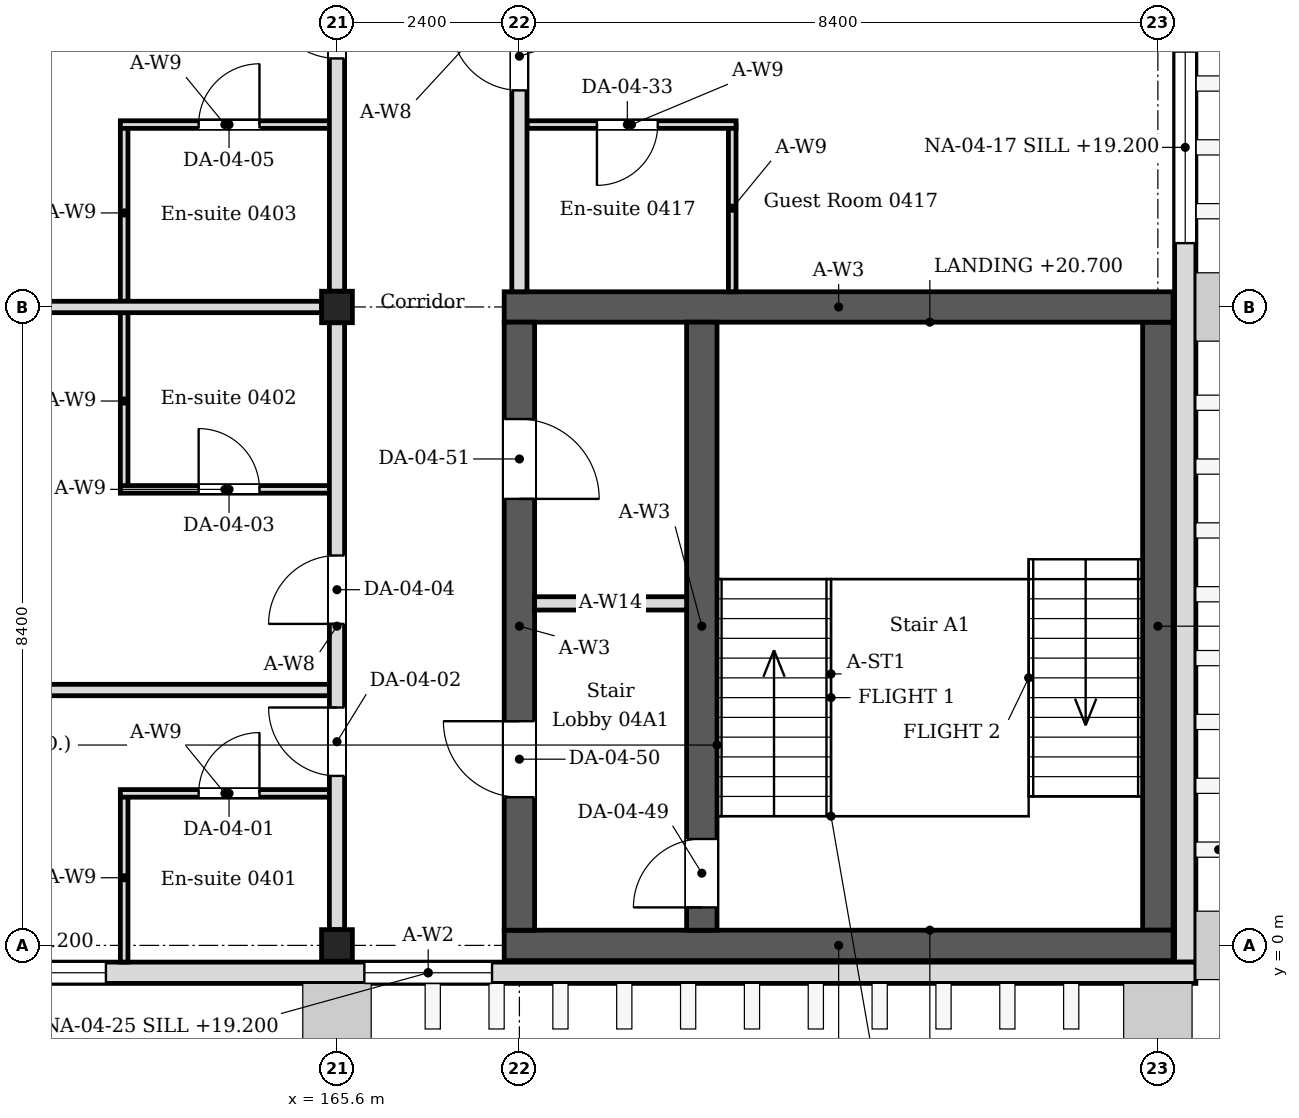
"""IFC4 building model, lengths in metres.
Left out: names, types, materials, properties, quantities, classifications, styles, units other than length and angle.
Written with IfcOpenShell. Run it as: python <this file> out.ifc"""

import sys

from ifc_helpers import new_model, si_unit, direction, frame, frame_2d, origin, origin_2d, place, context, subcontext, project, spatial, rectangle, i_section, extrude, element, fill, save


model = new_model("IFC4")
c1 = context("Model", 3, precision=1e-05, world=origin(), true_north=direction((0.0, 1.0)))
c2 = subcontext(c1, "Body", "Model", "MODEL_VIEW")
j1 = project(units=[si_unit("LENGTHUNIT", "METRE"), si_unit("PLANEANGLEUNIT", "RADIAN")], contexts=[c1])
p1 = place(None, origin())
s1 = spatial("IfcSite", under=j1, at=p1, CompositionType="ELEMENT")
p2 = place(p1, origin())
s2 = spatial("IfcBuilding", under=s1, at=p2, CompositionType="ELEMENT")
p3 = place(p2, frame((0.0, 0.0, 18.6)))
s3 = spatial("IfcBuildingStorey", under=s2, at=p3, CompositionType="ELEMENT", Elevation=18.6)
for number, where, z_axis, x_axis in (
    (1, (165.6, 0.0, 0.0), (0.0, 0.0, 1.0), (1.0, 0.0, 0.0)),
    (2, (165.6, 8.4, 0.0), (0.0, 0.0, 1.0), (1.0, 0.0, 0.0)),
):
    element("IfcColumn", number, at=place(p3, frame(where, z_axis=z_axis, x_axis=x_axis)), inside=s3, PredefinedType="COLUMN", context=c2, shape_type="SweptSolid", body=[
        extrude(i_section(OverallWidth=0.405, OverallDepth=0.414, WebThickness=0.018, FlangeThickness=0.028, FilletRadius=0.022, at=origin_2d()), origin(), (0.0, 0.0, 1.0), 4.2),
    ])
for number, where, z_axis, x_axis in (
    (3, (167.8, 0.0, 0.0), (0.0, 0.0, 1.0), (1.0, 0.0, 0.0)),
    (4, (167.8, 8.4, 0.0), (0.0, 0.0, 1.0), (1.0, 0.0, 0.0)),
):
    element("IfcWall", number, at=place(p3, frame(where, z_axis=z_axis, x_axis=x_axis)), inside=s3, PredefinedType="SOLIDWALL", context=c2, shape_type="SweptSolid", body=[
        extrude(rectangle(XDim=8.8, YDim=0.4, at=frame_2d((4.4, 0.0))), origin(), (0.0, 0.0, 1.0), 4.05),
    ])
p4 = place(p3, frame((168.0, 0.2, 0.0), z_axis=(0.0, 0.0, 1.0), x_axis=(0.0, 1.0, 0.0)))
e5 = element("IfcWall", 5, at=p4, inside=s3, PredefinedType="SOLIDWALL", context=c2, shape_type="SweptSolid", body=[
    extrude(rectangle(XDim=8.0, YDim=0.4, at=frame_2d((4.0, 0.0))), origin(), (0.0, 0.0, 1.0), 4.05),
])
p5 = place(p4, frame((1.75, 0.0, 0.0)))
e6 = element("IfcOpeningElement", 6, at=p5, cuts=e5, PredefinedType="OPENING", context=c2, shape_type="SweptSolid", body=[
    extrude(rectangle(XDim=1.0, YDim=2.1, at=frame_2d((0.5, 1.05))), frame((0.0, 0.21, 0.0), z_axis=(0.0, -1.0, 0.0), x_axis=(1.0, 0.0, 0.0)), (0.0, 0.0, 1.0), 0.42),
])
p6 = place(p4, frame((5.675, 0.0, 0.0)))
e7 = element("IfcOpeningElement", 7, at=p6, cuts=e5, PredefinedType="OPENING", context=c2, shape_type="SweptSolid", body=[
    extrude(rectangle(XDim=1.05, YDim=2.1, at=frame_2d((0.525, 1.05))), frame((0.0, 0.21, 0.0), z_axis=(0.0, -1.0, 0.0), x_axis=(1.0, 0.0, 0.0)), (0.0, 0.0, 1.0), 0.42),
])
p7 = place(p3, frame((176.4, 0.2, 0.0), z_axis=(0.0, 0.0, 1.0), x_axis=(0.0, 1.0, 0.0)))
e8 = element("IfcWall", 8, at=p7, inside=s3, PredefinedType="SOLIDWALL", context=c2, shape_type="SweptSolid", body=[
    extrude(rectangle(XDim=8.0, YDim=0.4, at=frame_2d((4.0, 0.0))), origin(), (0.0, 0.0, 1.0), 4.05),
])
p8 = place(p3, frame((176.76, -0.22, 0.0), z_axis=(0.0, 0.0, 1.0), x_axis=(0.0, 1.0, 0.0)))
e9 = element("IfcWall", 9, at=p8, inside=s3, PredefinedType="SOLIDWALL", context=c2, shape_type="SweptSolid", body=[
    extrude(rectangle(XDim=42.57, YDim=0.28, at=frame_2d((21.285, 0.0))), origin(), (0.0, 0.0, 1.0), 4.05),
])
p9 = place(p8, frame((9.46, 0.0, 0.6)))
e10 = element("IfcOpeningElement", 10, at=p9, cuts=e9, PredefinedType="OPENING", context=c2, shape_type="SweptSolid", body=[
    extrude(rectangle(XDim=2.52, YDim=2.4, at=frame_2d((1.26, 1.2))), frame((0.0, 0.15, 0.0), z_axis=(0.0, -1.0, 0.0), x_axis=(1.0, 0.0, 0.0)), (0.0, 0.0, 1.0), 0.3),
])
p10 = place(p8, frame((13.66, 0.0, 0.6)))
e11 = element("IfcOpeningElement", 11, at=p10, cuts=e9, PredefinedType="OPENING", context=c2, shape_type="SweptSolid", body=[
    extrude(rectangle(XDim=2.52, YDim=2.4, at=frame_2d((1.26, 1.2))), frame((0.0, 0.15, 0.0), z_axis=(0.0, -1.0, 0.0), x_axis=(1.0, 0.0, 0.0)), (0.0, 0.0, 1.0), 0.3),
])
p11 = place(p8, frame((17.86, 0.0, 0.6)))
e12 = element("IfcOpeningElement", 12, at=p11, cuts=e9, PredefinedType="OPENING", context=c2, shape_type="SweptSolid", body=[
    extrude(rectangle(XDim=2.52, YDim=2.4, at=frame_2d((1.26, 1.2))), frame((0.0, 0.15, 0.0), z_axis=(0.0, -1.0, 0.0), x_axis=(1.0, 0.0, 0.0)), (0.0, 0.0, 1.0), 0.3),
])
p12 = place(p8, frame((22.06, 0.0, 0.6)))
e13 = element("IfcOpeningElement", 13, at=p12, cuts=e9, PredefinedType="OPENING", context=c2, shape_type="SweptSolid", body=[
    extrude(rectangle(XDim=2.52, YDim=2.4, at=frame_2d((1.26, 1.2))), frame((0.0, 0.15, 0.0), z_axis=(0.0, -1.0, 0.0), x_axis=(1.0, 0.0, 0.0)), (0.0, 0.0, 1.0), 0.3),
])
p13 = place(p3, frame((156.7, -0.36, 0.0), z_axis=(0.0, 0.0, 1.0), x_axis=(1.0, 0.0, 0.0)))
e14 = element("IfcWall", 14, at=p13, inside=s3, PredefinedType="SOLIDWALL", context=c2, shape_type="SweptSolid", body=[
    extrude(rectangle(XDim=20.2, YDim=0.28, at=frame_2d((10.1, 0.0))), origin(), (0.0, 0.0, 1.0), 4.05),
])
p14 = place(p13, frame((9.26, 0.0, 0.6)))
e15 = element("IfcOpeningElement", 15, at=p14, cuts=e14, PredefinedType="OPENING", context=c2, shape_type="SweptSolid", body=[
    extrude(rectangle(XDim=1.68, YDim=2.4, at=frame_2d((0.84, 1.2))), frame((0.0, 0.15, 0.0), z_axis=(0.0, -1.0, 0.0), x_axis=(1.0, 0.0, 0.0)), (0.0, 0.0, 1.0), 0.3),
])
p15 = place(p13, frame((3.34, 0.0, 0.6)))
e16 = element("IfcOpeningElement", 16, at=p15, cuts=e14, PredefinedType="OPENING", context=c2, shape_type="SweptSolid", body=[
    extrude(rectangle(XDim=2.52, YDim=2.4, at=frame_2d((1.26, 1.2))), frame((0.0, 0.15, 0.0), z_axis=(0.0, -1.0, 0.0), x_axis=(1.0, 0.0, 0.0)), (0.0, 0.0, 1.0), 0.3),
])
p16 = place(p3, frame((162.8, -0.22, 0.0), z_axis=(0.0, 0.0, 1.0), x_axis=(0.0, 1.0, 0.0)))
e17 = element("IfcWall", 17, at=p16, inside=s3, PredefinedType="PARTITIONING", context=c2, shape_type="SweptSolid", body=[
    extrude(rectangle(XDim=2.22, YDim=0.1, at=frame_2d((1.11, 0.0))), origin(), (0.0, 0.0, 1.0), 4.05),
])
p17 = place(p3, frame((162.75, 2.0, 0.0), z_axis=(0.0, 0.0, 1.0), x_axis=(1.0, 0.0, 0.0)))
e18 = element("IfcWall", 18, at=p17, inside=s3, PredefinedType="PARTITIONING", context=c2, shape_type="SweptSolid", body=[
    extrude(rectangle(XDim=2.75, YDim=0.1, at=frame_2d((1.375, 0.0))), origin(), (0.0, 0.0, 1.0), 4.05),
])
p18 = place(p17, frame((1.03, 0.0, 0.0)))
e19 = element("IfcOpeningElement", 19, at=p18, cuts=e18, PredefinedType="OPENING", context=c2, shape_type="SweptSolid", body=[
    extrude(rectangle(XDim=0.8, YDim=2.1, at=frame_2d((0.4, 1.05))), frame((0.0, 0.06, 0.0), z_axis=(0.0, -1.0, 0.0), x_axis=(1.0, 0.0, 0.0)), (0.0, 0.0, 1.0), 0.12),
])
p19 = place(p3, frame((162.8, 6.0, 0.0), z_axis=(0.0, 0.0, 1.0), x_axis=(0.0, 1.0, 0.0)))
e20 = element("IfcWall", 20, at=p19, inside=s3, PredefinedType="PARTITIONING", context=c2, shape_type="SweptSolid", body=[
    extrude(rectangle(XDim=2.325, YDim=0.1, at=frame_2d((1.163, 0.0))), origin(), (0.0, 0.0, 1.0), 4.05),
])
p20 = place(p3, frame((162.75, 6.0, 0.0), z_axis=(0.0, 0.0, 1.0), x_axis=(1.0, 0.0, 0.0)))
e21 = element("IfcWall", 21, at=p20, inside=s3, PredefinedType="PARTITIONING", context=c2, shape_type="SweptSolid", body=[
    extrude(rectangle(XDim=2.75, YDim=0.1, at=frame_2d((1.375, 0.0))), origin(), (0.0, 0.0, 1.0), 4.05),
])
p21 = place(p20, frame((1.03, 0.0, 0.0)))
e22 = element("IfcOpeningElement", 22, at=p21, cuts=e21, PredefinedType="OPENING", context=c2, shape_type="SweptSolid", body=[
    extrude(rectangle(XDim=0.8, YDim=2.1, at=frame_2d((0.4, 1.05))), frame((0.0, 0.06, 0.0), z_axis=(0.0, -1.0, 0.0), x_axis=(1.0, 0.0, 0.0)), (0.0, 0.0, 1.0), 0.12),
])
p22 = place(p3, frame((162.8, 8.475, 0.0), z_axis=(0.0, 0.0, 1.0), x_axis=(0.0, 1.0, 0.0)))
e23 = element("IfcWall", 23, at=p22, inside=s3, PredefinedType="PARTITIONING", context=c2, shape_type="SweptSolid", body=[
    extrude(rectangle(XDim=2.325, YDim=0.1, at=frame_2d((1.163, 0.0))), origin(), (0.0, 0.0, 1.0), 4.05),
])
p23 = place(p3, frame((162.75, 10.8, 0.0), z_axis=(0.0, 0.0, 1.0), x_axis=(1.0, 0.0, 0.0)))
e24 = element("IfcWall", 24, at=p23, inside=s3, PredefinedType="PARTITIONING", context=c2, shape_type="SweptSolid", body=[
    extrude(rectangle(XDim=2.75, YDim=0.1, at=frame_2d((1.375, 0.0))), origin(), (0.0, 0.0, 1.0), 4.05),
])
p24 = place(p23, frame((1.03, 0.0, 0.0)))
e25 = element("IfcOpeningElement", 25, at=p24, cuts=e24, PredefinedType="OPENING", context=c2, shape_type="SweptSolid", body=[
    extrude(rectangle(XDim=0.8, YDim=2.1, at=frame_2d((0.4, 1.05))), frame((0.0, 0.06, 0.0), z_axis=(0.0, -1.0, 0.0), x_axis=(1.0, 0.0, 0.0)), (0.0, 0.0, 1.0), 0.12),
])
p25 = place(p3, frame((170.8, 8.6, 0.0), z_axis=(0.0, 0.0, 1.0), x_axis=(0.0, 1.0, 0.0)))
e26 = element("IfcWall", 26, at=p25, inside=s3, PredefinedType="PARTITIONING", context=c2, shape_type="SweptSolid", body=[
    extrude(rectangle(XDim=2.2, YDim=0.1, at=frame_2d((1.1, 0.0))), origin(), (0.0, 0.0, 1.0), 4.05),
])
p26 = place(p3, frame((170.85, 10.8, 0.0), z_axis=(0.0, 0.0, 1.0), x_axis=(-1.0, 0.0, 0.0)))
e27 = element("IfcWall", 27, at=p26, inside=s3, PredefinedType="PARTITIONING", context=c2, shape_type="SweptSolid", body=[
    extrude(rectangle(XDim=2.75, YDim=0.1, at=frame_2d((1.375, 0.0))), origin(), (0.0, 0.0, 1.0), 4.05),
])
p27 = place(p26, frame((1.03, 0.0, 0.0)))
e28 = element("IfcOpeningElement", 28, at=p27, cuts=e27, PredefinedType="OPENING", context=c2, shape_type="SweptSolid", body=[
    extrude(rectangle(XDim=0.8, YDim=2.1, at=frame_2d((0.4, 1.05))), frame((0.0, 0.06, 0.0), z_axis=(0.0, -1.0, 0.0), x_axis=(1.0, 0.0, 0.0)), (0.0, 0.0, 1.0), 0.12),
])
p28 = place(p3, frame((157.403, 8.4, 0.0), z_axis=(0.0, 0.0, 1.0), x_axis=(1.0, 0.0, 0.0)))
e29 = element("IfcWall", 29, at=p28, inside=s3, PredefinedType="PARTITIONING", context=c2, shape_type="SweptSolid", body=[
    extrude(rectangle(XDim=7.995, YDim=0.15, at=frame_2d((3.998, 0.0))), origin(), (0.0, 0.0, 1.0), 3.604),
])
p29 = place(p3, frame((156.98, 3.36, 0.0), z_axis=(0.0, 0.0, 1.0), x_axis=(1.0, 0.0, 0.0)))
e30 = element("IfcWall", 30, at=p29, inside=s3, PredefinedType="PARTITIONING", context=c2, shape_type="SweptSolid", body=[
    extrude(rectangle(XDim=8.52, YDim=0.15, at=frame_2d((4.26, 0.0))), origin(), (0.0, 0.0, 1.0), 3.604),
])
p30 = place(p3, frame((165.6, 0.207, 0.0), z_axis=(0.0, 0.0, 1.0), x_axis=(0.0, 1.0, 0.0)))
e31 = element("IfcWall", 31, at=p30, inside=s3, PredefinedType="PARTITIONING", context=c2, shape_type="SweptSolid", body=[
    extrude(rectangle(XDim=7.986, YDim=0.2, at=frame_2d((3.993, 0.0))), origin(), (0.0, 0.0, 1.0), 3.45),
])
p31 = place(p30, frame((2.023, 0.0, 0.0)))
e32 = element("IfcOpeningElement", 32, at=p31, cuts=e31, PredefinedType="OPENING", context=c2, shape_type="SweptSolid", body=[
    extrude(rectangle(XDim=0.9, YDim=2.1, at=frame_2d((0.45, 1.05))), frame((0.0, 0.11, 0.0), z_axis=(0.0, -1.0, 0.0), x_axis=(1.0, 0.0, 0.0)), (0.0, 0.0, 1.0), 0.22),
])
p32 = place(p30, frame((4.023, 0.0, 0.0)))
e33 = element("IfcOpeningElement", 33, at=p32, cuts=e31, PredefinedType="OPENING", context=c2, shape_type="SweptSolid", body=[
    extrude(rectangle(XDim=0.9, YDim=2.1, at=frame_2d((0.45, 1.05))), frame((0.0, 0.11, 0.0), z_axis=(0.0, -1.0, 0.0), x_axis=(1.0, 0.0, 0.0)), (0.0, 0.0, 1.0), 0.22),
])
p33 = place(p3, frame((165.6, 8.607, 0.0), z_axis=(0.0, 0.0, 1.0), x_axis=(0.0, 1.0, 0.0)))
e34 = element("IfcWall", 34, at=p33, inside=s3, PredefinedType="PARTITIONING", context=c2, shape_type="SweptSolid", body=[
    extrude(rectangle(XDim=7.986, YDim=0.2, at=frame_2d((3.993, 0.0))), origin(), (0.0, 0.0, 1.0), 3.45),
])
p34 = place(p33, frame((3.063, 0.0, 0.0)))
e35 = element("IfcOpeningElement", 35, at=p34, cuts=e34, PredefinedType="OPENING", context=c2, shape_type="SweptSolid", body=[
    extrude(rectangle(XDim=0.9, YDim=2.1, at=frame_2d((0.45, 1.05))), frame((0.0, 0.11, 0.0), z_axis=(0.0, -1.0, 0.0), x_axis=(1.0, 0.0, 0.0)), (0.0, 0.0, 1.0), 0.22),
])
p35 = place(p33, frame((5.063, 0.0, 0.0)))
e36 = element("IfcOpeningElement", 36, at=p35, cuts=e34, PredefinedType="OPENING", context=c2, shape_type="SweptSolid", body=[
    extrude(rectangle(XDim=0.9, YDim=2.1, at=frame_2d((0.45, 1.05))), frame((0.0, 0.11, 0.0), z_axis=(0.0, -1.0, 0.0), x_axis=(1.0, 0.0, 0.0)), (0.0, 0.0, 1.0), 0.22),
])
p36 = place(p3, frame((168.0, 8.6, 0.0), z_axis=(0.0, 0.0, 1.0), x_axis=(0.0, 1.0, 0.0)))
e37 = element("IfcWall", 37, at=p36, inside=s3, PredefinedType="PARTITIONING", context=c2, shape_type="SweptSolid", body=[
    extrude(rectangle(XDim=7.993, YDim=0.2, at=frame_2d((3.997, 0.0))), origin(), (0.0, 0.0, 1.0), 3.45),
])
p37 = place(p36, frame((2.65, 0.0, 0.0)))
e38 = element("IfcOpeningElement", 38, at=p37, cuts=e37, PredefinedType="OPENING", context=c2, shape_type="SweptSolid", body=[
    extrude(rectangle(XDim=0.9, YDim=2.1, at=frame_2d((0.45, 1.05))), frame((0.0, 0.11, 0.0), z_axis=(0.0, -1.0, 0.0), x_axis=(1.0, 0.0, 0.0)), (0.0, 0.0, 1.0), 0.22),
])
p38 = place(p36, frame((4.45, 0.0, 0.0)))
e39 = element("IfcOpeningElement", 39, at=p38, cuts=e37, PredefinedType="OPENING", context=c2, shape_type="SweptSolid", body=[
    extrude(rectangle(XDim=0.9, YDim=2.1, at=frame_2d((0.45, 1.05))), frame((0.0, 0.11, 0.0), z_axis=(0.0, -1.0, 0.0), x_axis=(1.0, 0.0, 0.0)), (0.0, 0.0, 1.0), 0.22),
])
p39 = place(p3, frame((170.4, 0.2, 0.0), z_axis=(0.0, 0.0, 1.0), x_axis=(0.0, 1.0, 0.0)))
e40 = element("IfcWall", 40, at=p39, inside=s3, PredefinedType="SOLIDWALL", context=c2, shape_type="SweptSolid", body=[
    extrude(rectangle(XDim=8.0, YDim=0.4, at=frame_2d((4.0, 0.0))), origin(), (0.0, 0.0, 1.0), 4.05),
])
p40 = place(p39, frame((0.3, 0.0, 0.0)))
e41 = element("IfcOpeningElement", 41, at=p40, cuts=e40, PredefinedType="OPENING", context=c2, shape_type="SweptSolid", body=[
    extrude(rectangle(XDim=0.9, YDim=2.1, at=frame_2d((0.45, 1.05))), frame((0.0, 0.21, 0.0), z_axis=(0.0, -1.0, 0.0), x_axis=(1.0, 0.0, 0.0)), (0.0, 0.0, 1.0), 0.42),
])
p41 = place(p3, frame((168.2, 4.5, 0.0), z_axis=(0.0, 0.0, 1.0), x_axis=(1.0, 0.0, 0.0)))
e42 = element("IfcWall", 42, at=p41, inside=s3, PredefinedType="PARTITIONING", context=c2, shape_type="SweptSolid", body=[
    extrude(rectangle(XDim=2.0, YDim=0.175, at=frame_2d((1.0, 0.0))), origin(), (0.0, 0.0, 1.0), 4.05),
])
p42 = place(p9, origin())
e43 = element("IfcWindow", 43, at=p42, inside=s3, PartitioningType="SINGLE_PANEL", PredefinedType="WINDOW", context=c2, shape_type="SweptSolid", body=[
    extrude(rectangle(XDim=2.52, YDim=2.4, at=frame_2d((1.26, 1.2))), frame((0.0, 0.03, 0.0), z_axis=(0.0, -1.0, 0.0), x_axis=(1.0, 0.0, 0.0)), (0.0, 0.0, 1.0), 0.06),
])
fill(e10, e43)
p43 = place(p14, origin())
e44 = element("IfcWindow", 44, at=p43, inside=s3, PartitioningType="SINGLE_PANEL", PredefinedType="WINDOW", context=c2, shape_type="SweptSolid", body=[
    extrude(rectangle(XDim=1.68, YDim=2.4, at=frame_2d((0.84, 1.2))), frame((0.0, 0.03, 0.0), z_axis=(0.0, -1.0, 0.0), x_axis=(1.0, 0.0, 0.0)), (0.0, 0.0, 1.0), 0.06),
])
fill(e15, e44)
p44 = place(p15, origin())
e45 = element("IfcWindow", 45, at=p44, inside=s3, PartitioningType="SINGLE_PANEL", PredefinedType="WINDOW", context=c2, shape_type="SweptSolid", body=[
    extrude(rectangle(XDim=2.52, YDim=2.4, at=frame_2d((1.26, 1.2))), frame((0.0, 0.03, 0.0), z_axis=(0.0, -1.0, 0.0), x_axis=(1.0, 0.0, 0.0)), (0.0, 0.0, 1.0), 0.06),
])
fill(e16, e45)
p45 = place(p18, origin())
e46 = element("IfcDoor", 46, at=p45, inside=s3, OperationType="SINGLE_SWING_RIGHT", PredefinedType="DOOR", context=c2, shape_type="SweptSolid", body=[
    extrude(rectangle(XDim=0.8, YDim=2.1, at=frame_2d((0.4, 1.05))), frame((0.0, 0.025, 0.0), z_axis=(0.0, -1.0, 0.0), x_axis=(1.0, 0.0, 0.0)), (0.0, 0.0, 1.0), 0.05),
])
fill(e19, e46)
p46 = place(p31, origin())
e47 = element("IfcDoor", 47, at=p46, inside=s3, OperationType="SINGLE_SWING_RIGHT", PredefinedType="DOOR", context=c2, shape_type="SweptSolid", body=[
    extrude(rectangle(XDim=0.9, YDim=2.1, at=frame_2d((0.45, 1.05))), frame((0.0, 0.025, 0.0), z_axis=(0.0, -1.0, 0.0), x_axis=(1.0, 0.0, 0.0)), (0.0, 0.0, 1.0), 0.05),
])
fill(e32, e47)
p47 = place(p21, origin())
e48 = element("IfcDoor", 48, at=p47, inside=s3, OperationType="SINGLE_SWING_LEFT", PredefinedType="DOOR", context=c2, shape_type="SweptSolid", body=[
    extrude(rectangle(XDim=0.8, YDim=2.1, at=frame_2d((0.4, 1.05))), frame((0.0, 0.025, 0.0), z_axis=(0.0, -1.0, 0.0), x_axis=(1.0, 0.0, 0.0)), (0.0, 0.0, 1.0), 0.05),
])
fill(e22, e48)
p48 = place(p32, origin())
e49 = element("IfcDoor", 49, at=p48, inside=s3, OperationType="SINGLE_SWING_LEFT", PredefinedType="DOOR", context=c2, shape_type="SweptSolid", body=[
    extrude(rectangle(XDim=0.9, YDim=2.1, at=frame_2d((0.45, 1.05))), frame((0.0, 0.025, 0.0), z_axis=(0.0, -1.0, 0.0), x_axis=(1.0, 0.0, 0.0)), (0.0, 0.0, 1.0), 0.05),
])
fill(e33, e49)
p49 = place(p24, origin())
e50 = element("IfcDoor", 50, at=p49, inside=s3, OperationType="SINGLE_SWING_RIGHT", PredefinedType="DOOR", context=c2, shape_type="SweptSolid", body=[
    extrude(rectangle(XDim=0.8, YDim=2.1, at=frame_2d((0.4, 1.05))), frame((0.0, 0.025, 0.0), z_axis=(0.0, -1.0, 0.0), x_axis=(1.0, 0.0, 0.0)), (0.0, 0.0, 1.0), 0.05),
])
fill(e25, e50)
p50 = place(p34, origin())
e51 = element("IfcDoor", 51, at=p50, inside=s3, OperationType="SINGLE_SWING_RIGHT", PredefinedType="DOOR", context=c2, shape_type="SweptSolid", body=[
    extrude(rectangle(XDim=0.9, YDim=2.1, at=frame_2d((0.45, 1.05))), frame((0.0, 0.025, 0.0), z_axis=(0.0, -1.0, 0.0), x_axis=(1.0, 0.0, 0.0)), (0.0, 0.0, 1.0), 0.05),
])
fill(e35, e51)
p51 = place(p27, origin())
e52 = element("IfcDoor", 52, at=p51, inside=s3, OperationType="SINGLE_SWING_RIGHT", PredefinedType="DOOR", context=c2, shape_type="SweptSolid", body=[
    extrude(rectangle(XDim=0.8, YDim=2.1, at=frame_2d((0.4, 1.05))), frame((0.0, 0.025, 0.0), z_axis=(0.0, -1.0, 0.0), x_axis=(1.0, 0.0, 0.0)), (0.0, 0.0, 1.0), 0.05),
])
fill(e28, e52)
p52 = place(p37, origin())
e53 = element("IfcDoor", 53, at=p52, inside=s3, OperationType="SINGLE_SWING_RIGHT", PredefinedType="DOOR", context=c2, shape_type="SweptSolid", body=[
    extrude(rectangle(XDim=0.9, YDim=2.1, at=frame_2d((0.45, 1.05))), frame((0.0, 0.025, 0.0), z_axis=(0.0, -1.0, 0.0), x_axis=(1.0, 0.0, 0.0)), (0.0, 0.0, 1.0), 0.05),
])
fill(e38, e53)
p53 = place(p40, origin())
e54 = element("IfcDoor", 54, at=p53, inside=s3, OperationType="SINGLE_SWING_LEFT", PredefinedType="DOOR", context=c2, shape_type="SweptSolid", body=[
    extrude(rectangle(XDim=0.9, YDim=2.1, at=frame_2d((0.45, 1.05))), frame((0.0, 0.025, 0.0), z_axis=(0.0, -1.0, 0.0), x_axis=(1.0, 0.0, 0.0)), (0.0, 0.0, 1.0), 0.05),
])
fill(e41, e54)
p54 = place(p5, origin())
e55 = element("IfcDoor", 55, at=p54, inside=s3, OperationType="SINGLE_SWING_RIGHT", PredefinedType="DOOR", context=c2, shape_type="SweptSolid", body=[
    extrude(rectangle(XDim=1.0, YDim=2.1, at=frame_2d((0.5, 1.05))), frame((0.0, 0.025, 0.0), z_axis=(0.0, -1.0, 0.0), x_axis=(1.0, 0.0, 0.0)), (0.0, 0.0, 1.0), 0.05),
])
fill(e6, e55)
p55 = place(p6, origin())
e56 = element("IfcDoor", 56, at=p55, inside=s3, OperationType="SINGLE_SWING_LEFT", PredefinedType="DOOR", context=c2, shape_type="SweptSolid", body=[
    extrude(rectangle(XDim=1.05, YDim=2.1, at=frame_2d((0.525, 1.05))), frame((0.0, 0.025, 0.0), z_axis=(0.0, -1.0, 0.0), x_axis=(1.0, 0.0, 0.0)), (0.0, 0.0, 1.0), 0.05),
])
fill(e7, e56)
save(model, sys.argv[1])
